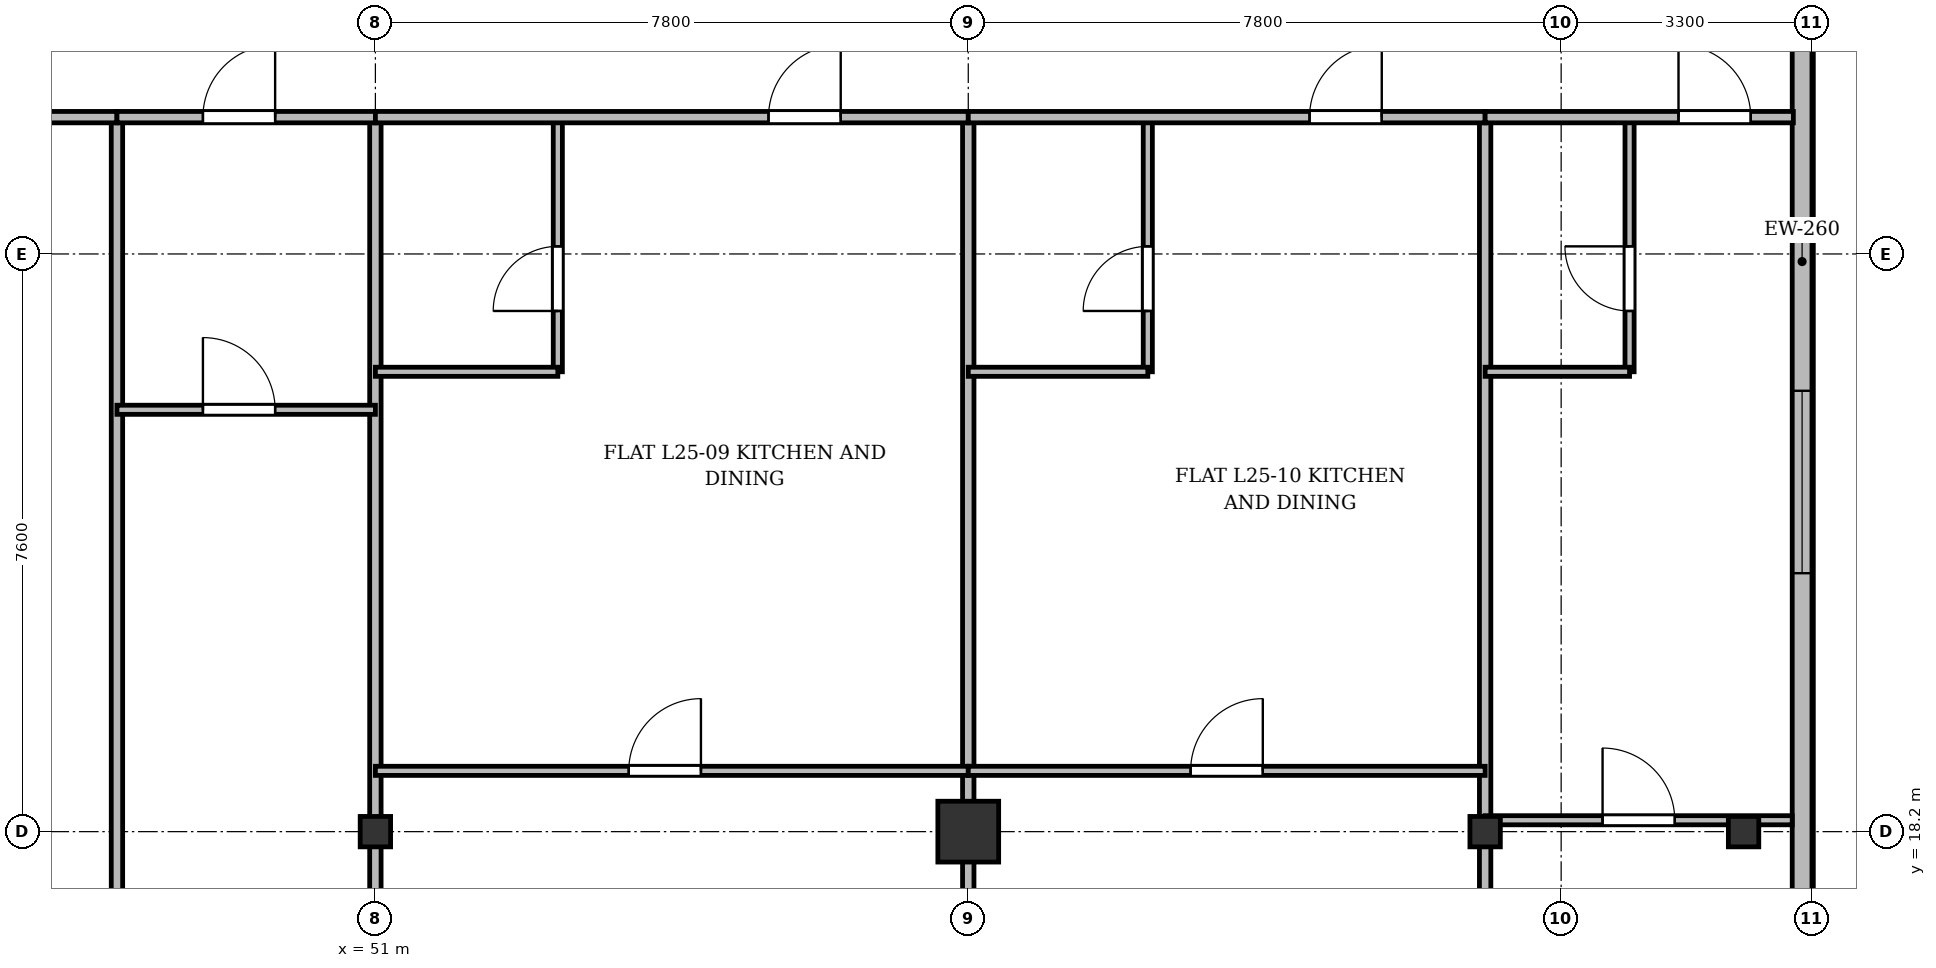
"""IFC4 building model, lengths in metres.
Left out: names, types, materials, properties, quantities, classifications, styles, units other than length and angle.
Written with IfcOpenShell. Run it as: python <this file> out.ifc"""

import sys

from ifc_helpers import new_model, si_unit, direction, frame, frame_2d, origin, origin_2d, place, context, subcontext, project, spatial, rectangle, i_section, extrude, source, transform, mapped, element, fill, save


model = new_model("IFC4")
c1 = context("Model", 3, precision=1e-05, world=origin(), true_north=direction((0.0, 1.0)))
c2 = subcontext(c1, "Body", "Model", "MODEL_VIEW")
j1 = project(units=[si_unit("LENGTHUNIT", "METRE"), si_unit("PLANEANGLEUNIT", "RADIAN")], contexts=[c1])
p1 = place(None, origin())
s1 = spatial("IfcSite", under=j1, at=p1, CompositionType="ELEMENT")
p2 = place(p1, origin())
s2 = spatial("IfcBuilding", under=s1, at=p2, CompositionType="ELEMENT")
p3 = place(p2, frame((0.0, 0.0, 99.7)))
s3 = spatial("IfcBuildingStorey", under=s2, at=p3, CompositionType="ELEMENT", Elevation=99.7)
m1 = source(origin(), c2, "Body", "SweptSolid", [
    extrude(i_section(OverallWidth=0.4, OverallDepth=0.4, WebThickness=0.022, FlangeThickness=0.035, at=origin_2d()), origin(), (0.0, 0.0, 1.0), 3.6),
])
p4 = place(p3, frame((51.0, 18.2, 0.0), z_axis=(0.0, 0.0, 1.0), x_axis=(1.0, 0.0, 0.0)))
e1 = element("IfcColumn", 1, at=p4, inside=s3, PredefinedType="COLUMN", context=c2, shape_type="MappedRepresentation", body=[
    mapped(m1, transform((0.0, 0.0, 0.0), x_axis=(1.0, 0.0, 0.0), y_axis=(0.0, 1.0, 0.0), z_axis=(0.0, 0.0, 1.0), scale=1.0)),
])
m2 = source(origin(), c2, "Body", "SweptSolid", [
    extrude(rectangle(XDim=0.8, YDim=0.8, at=origin_2d()), origin(), (0.0, 0.0, 1.0), 3.6),
])
p5 = place(p3, frame((58.8, 18.2, 0.0), z_axis=(0.0, 0.0, 1.0), x_axis=(1.0, 0.0, 0.0)))
e2 = element("IfcColumn", 2, at=p5, inside=s3, PredefinedType="COLUMN", context=c2, shape_type="MappedRepresentation", body=[
    mapped(m2, transform((0.0, 0.0, 0.0), x_axis=(1.0, 0.0, 0.0), y_axis=(0.0, 1.0, 0.0), z_axis=(0.0, 0.0, 1.0), scale=1.0)),
])
for number, where, z_axis, x_axis in (
    (3, (65.6, 18.2, 0.0), (0.0, 0.0, 1.0), (1.0, 0.0, 0.0)),
    (4, (69.0, 18.2, 0.0), (0.0, 0.0, 1.0), (1.0, 0.0, 0.0)),
):
    element("IfcColumn", number, at=place(p3, frame(where, z_axis=z_axis, x_axis=x_axis)), inside=s3, PredefinedType="COLUMN", context=c2, shape_type="MappedRepresentation", body=[
        mapped(m1, transform((0.0, 0.0, 0.0), x_axis=(1.0, 0.0, 0.0), y_axis=(0.0, 1.0, 0.0), z_axis=(0.0, 0.0, 1.0), scale=1.0)),
    ])
p6 = place(p3, frame((69.77, 45.5, 0.0), z_axis=(0.0, 0.0, 1.0), x_axis=(0.0, -1.0, 0.0)))
e5 = element("IfcWall", 5, at=p6, inside=s3, PredefinedType="SOLIDWALL", context=c2, shape_type="SweptSolid", body=[
    extrude(rectangle(XDim=39.6, YDim=0.26, at=frame_2d((19.8, 0.0))), origin(), (0.0, 0.0, 1.0), 3.34),
])
p7 = place(p6, frame((36.95, 0.0, 0.92)))
e6 = element("IfcOpeningElement", 6, at=p7, cuts=e5, PredefinedType="OPENING", context=c2, shape_type="SweptSolid", body=[
    extrude(rectangle(XDim=1.2, YDim=1.65, at=frame_2d((0.6, 0.825))), frame((0.0, 0.14, 0.0), z_axis=(0.0, -1.0, 0.0), x_axis=(1.0, 0.0, 0.0)), (0.0, 0.0, 1.0), 0.28),
])
p8 = place(p6, frame((32.9, 0.0, 0.92)))
e7 = element("IfcOpeningElement", 7, at=p8, cuts=e5, PredefinedType="OPENING", context=c2, shape_type="SweptSolid", body=[
    extrude(rectangle(XDim=2.4, YDim=2.1, at=frame_2d((1.2, 1.05))), frame((0.0, 0.14, 0.0), z_axis=(0.0, -1.0, 0.0), x_axis=(1.0, 0.0, 0.0)), (0.0, 0.0, 1.0), 0.28),
])
p9 = place(p6, frame((28.7, 0.0, 0.92)))
e8 = element("IfcOpeningElement", 8, at=p9, cuts=e5, PredefinedType="OPENING", context=c2, shape_type="SweptSolid", body=[
    extrude(rectangle(XDim=2.4, YDim=2.1, at=frame_2d((1.2, 1.05))), frame((0.0, 0.14, 0.0), z_axis=(0.0, -1.0, 0.0), x_axis=(1.0, 0.0, 0.0)), (0.0, 0.0, 1.0), 0.28),
])
p10 = place(p6, frame((21.5, 0.0, 0.92)))
e9 = element("IfcOpeningElement", 9, at=p10, cuts=e5, PredefinedType="OPENING", context=c2, shape_type="SweptSolid", body=[
    extrude(rectangle(XDim=2.4, YDim=2.1, at=frame_2d((1.2, 1.05))), frame((0.0, 0.14, 0.0), z_axis=(0.0, -1.0, 0.0), x_axis=(1.0, 0.0, 0.0)), (0.0, 0.0, 1.0), 0.28),
])
p11 = place(p6, frame((7.5, 0.0, 0.92)))
e10 = element("IfcOpeningElement", 10, at=p11, cuts=e5, PredefinedType="OPENING", context=c2, shape_type="SweptSolid", body=[
    extrude(rectangle(XDim=2.4, YDim=2.1, at=frame_2d((1.2, 1.05))), frame((0.0, 0.14, 0.0), z_axis=(0.0, -1.0, 0.0), x_axis=(1.0, 0.0, 0.0)), (0.0, 0.0, 1.0), 0.28),
])
p12 = place(p6, frame((4.5, 0.0, 0.92)))
e11 = element("IfcOpeningElement", 11, at=p12, cuts=e5, PredefinedType="OPENING", context=c2, shape_type="SweptSolid", body=[
    extrude(rectangle(XDim=1.2, YDim=1.65, at=frame_2d((0.6, 0.825))), frame((0.0, 0.14, 0.0), z_axis=(0.0, -1.0, 0.0), x_axis=(1.0, 0.0, 0.0)), (0.0, 0.0, 1.0), 0.28),
])
p13 = place(p6, frame((1.15, 0.0, 0.92)))
e12 = element("IfcOpeningElement", 12, at=p13, cuts=e5, PredefinedType="OPENING", context=c2, shape_type="SweptSolid", body=[
    extrude(rectangle(XDim=1.2, YDim=1.65, at=frame_2d((0.6, 0.825))), frame((0.0, 0.14, 0.0), z_axis=(0.0, -1.0, 0.0), x_axis=(1.0, 0.0, 0.0)), (0.0, 0.0, 1.0), 0.28),
])
p14 = place(p3, frame((47.6, 3.145, 0.0), z_axis=(0.0, 0.0, 1.0), x_axis=(0.0, 1.0, 0.0)))
e13 = element("IfcWall", 13, at=p14, inside=s3, PredefinedType="PARTITIONING", context=c2, shape_type="SweptSolid", body=[
    extrude(rectangle(XDim=24.455, YDim=0.15, at=frame_2d((12.228, 0.0))), origin(), (0.0, 0.0, 1.0), 2.752),
])
for number, where, z_axis, x_axis in (
    (14, (51.0, 3.145, 0.0), (0.0, 0.0, 1.0), (0.0, 1.0, 0.0)),
    (15, (58.8, 3.145, 0.0), (0.0, 0.0, 1.0), (0.0, 1.0, 0.0)),
    (16, (65.6, 3.145, 0.0), (0.0, 0.0, 1.0), (0.0, 1.0, 0.0)),
):
    element("IfcWall", number, at=place(p3, frame(where, z_axis=z_axis, x_axis=x_axis)), inside=s3, PredefinedType="PARTITIONING", context=c2, shape_type="SweptSolid", body=[
        extrude(rectangle(XDim=24.455, YDim=0.15, at=frame_2d((12.228, 0.0))), origin(), (0.0, 0.0, 1.0), 2.84),
    ])
p15 = place(p3, frame((43.8, 27.6, 0.0), z_axis=(0.0, 0.0, 1.0), x_axis=(1.0, 0.0, 0.0)))
e17 = element("IfcWall", 17, at=p15, inside=s3, PredefinedType="PARTITIONING", context=c2, shape_type="SweptSolid", body=[
    extrude(rectangle(XDim=3.8, YDim=0.15, at=frame_2d((1.9, 0.0))), origin(), (0.0, 0.0, 1.0), 2.84),
])
p16 = place(p15, frame((1.33, 0.0, 0.0)))
e18 = element("IfcOpeningElement", 18, at=p16, cuts=e17, PredefinedType="OPENING", context=c2, shape_type="SweptSolid", body=[
    extrude(rectangle(XDim=0.95, YDim=2.15, at=frame_2d((0.475, 1.075))), frame((0.0, 0.085, 0.0), z_axis=(0.0, -1.0, 0.0), x_axis=(1.0, 0.0, 0.0)), (0.0, 0.0, 1.0), 0.17),
])
p17 = place(p3, frame((47.6, 27.6, 0.0), z_axis=(0.0, 0.0, 1.0), x_axis=(1.0, 0.0, 0.0)))
e19 = element("IfcWall", 19, at=p17, inside=s3, PredefinedType="PARTITIONING", context=c2, shape_type="SweptSolid", body=[
    extrude(rectangle(XDim=3.4, YDim=0.15, at=frame_2d((1.7, 0.0))), origin(), (0.0, 0.0, 1.0), 2.84),
])
p18 = place(p17, frame((1.131, 0.0, 0.0)))
e20 = element("IfcOpeningElement", 20, at=p18, cuts=e19, PredefinedType="OPENING", context=c2, shape_type="SweptSolid", body=[
    extrude(rectangle(XDim=0.95, YDim=2.15, at=frame_2d((0.475, 1.075))), frame((0.0, 0.085, 0.0), z_axis=(0.0, -1.0, 0.0), x_axis=(1.0, 0.0, 0.0)), (0.0, 0.0, 1.0), 0.17),
])
p19 = place(p3, frame((47.6, 23.75, 0.0), z_axis=(0.0, 0.0, 1.0), x_axis=(1.0, 0.0, 0.0)))
e21 = element("IfcWall", 21, at=p19, inside=s3, PredefinedType="PARTITIONING", context=c2, shape_type="SweptSolid", body=[
    extrude(rectangle(XDim=3.4, YDim=0.12, at=frame_2d((1.7, 0.0))), origin(), (0.0, 0.0, 1.0), 2.84),
])
p20 = place(p19, frame((1.131, 0.0, 0.0)))
e22 = element("IfcOpeningElement", 22, at=p20, cuts=e21, PredefinedType="OPENING", context=c2, shape_type="SweptSolid", body=[
    extrude(rectangle(XDim=0.95, YDim=2.15, at=frame_2d((0.475, 1.075))), frame((0.0, 0.07, 0.0), z_axis=(0.0, -1.0, 0.0), x_axis=(1.0, 0.0, 0.0)), (0.0, 0.0, 1.0), 0.14),
])
p21 = place(p3, frame((51.0, 19.0, 0.0), z_axis=(0.0, 0.0, 1.0), x_axis=(1.0, 0.0, 0.0)))
e23 = element("IfcWall", 23, at=p21, inside=s3, PredefinedType="PARTITIONING", context=c2, shape_type="SweptSolid", body=[
    extrude(rectangle(XDim=7.8, YDim=0.12, at=frame_2d((3.9, 0.0))), origin(), (0.0, 0.0, 1.0), 2.84),
])
p22 = place(p21, frame((3.333, 0.0, 0.0)))
e24 = element("IfcOpeningElement", 24, at=p22, cuts=e23, PredefinedType="OPENING", context=c2, shape_type="SweptSolid", body=[
    extrude(rectangle(XDim=0.95, YDim=2.15, at=frame_2d((0.475, 1.075))), frame((0.0, 0.07, 0.0), z_axis=(0.0, -1.0, 0.0), x_axis=(1.0, 0.0, 0.0)), (0.0, 0.0, 1.0), 0.14),
])
p23 = place(p3, frame((53.4, 24.25, 0.0), z_axis=(0.0, 0.0, 1.0), x_axis=(0.0, 1.0, 0.0)))
e25 = element("IfcWall", 25, at=p23, inside=s3, PredefinedType="PARTITIONING", context=c2, shape_type="SweptSolid", body=[
    extrude(rectangle(XDim=3.35, YDim=0.12, at=frame_2d((1.675, 0.0))), origin(), (0.0, 0.0, 1.0), 2.99),
])
p24 = place(p23, frame((0.8, 0.0, 0.0)))
e26 = element("IfcOpeningElement", 26, at=p24, cuts=e25, PredefinedType="OPENING", context=c2, shape_type="SweptSolid", body=[
    extrude(rectangle(XDim=0.85, YDim=2.1, at=frame_2d((0.425, 1.05))), frame((0.0, 0.07, 0.0), z_axis=(0.0, -1.0, 0.0), x_axis=(1.0, 0.0, 0.0)), (0.0, 0.0, 1.0), 0.14),
])
p25 = place(p3, frame((51.0, 24.25, 0.0), z_axis=(0.0, 0.0, 1.0), x_axis=(1.0, 0.0, 0.0)))
e27 = element("IfcWall", 27, at=p25, inside=s3, PredefinedType="PARTITIONING", context=c2, shape_type="SweptSolid", body=[
    extrude(rectangle(XDim=2.4, YDim=0.12, at=frame_2d((1.2, 0.0))), origin(), (0.0, 0.0, 1.0), 2.84),
])
p26 = place(p3, frame((51.0, 27.6, 0.0), z_axis=(0.0, 0.0, 1.0), x_axis=(1.0, 0.0, 0.0)))
e28 = element("IfcWall", 28, at=p26, inside=s3, PredefinedType="PARTITIONING", context=c2, shape_type="SweptSolid", body=[
    extrude(rectangle(XDim=7.8, YDim=0.15, at=frame_2d((3.9, 0.0))), origin(), (0.0, 0.0, 1.0), 2.84),
])
p27 = place(p26, frame((5.172, 0.0, 0.0)))
e29 = element("IfcOpeningElement", 29, at=p27, cuts=e28, PredefinedType="OPENING", context=c2, shape_type="SweptSolid", body=[
    extrude(rectangle(XDim=0.95, YDim=2.15, at=frame_2d((0.475, 1.075))), frame((0.0, 0.085, 0.0), z_axis=(0.0, -1.0, 0.0), x_axis=(1.0, 0.0, 0.0)), (0.0, 0.0, 1.0), 0.17),
])
p28 = place(p3, frame((58.8, 19.0, 0.0), z_axis=(0.0, 0.0, 1.0), x_axis=(1.0, 0.0, 0.0)))
e30 = element("IfcWall", 30, at=p28, inside=s3, PredefinedType="PARTITIONING", context=c2, shape_type="SweptSolid", body=[
    extrude(rectangle(XDim=6.8, YDim=0.12, at=frame_2d((3.4, 0.0))), origin(), (0.0, 0.0, 1.0), 2.84),
])
p29 = place(p28, frame((2.925, 0.0, 0.0)))
e31 = element("IfcOpeningElement", 31, at=p29, cuts=e30, PredefinedType="OPENING", context=c2, shape_type="SweptSolid", body=[
    extrude(rectangle(XDim=0.95, YDim=2.15, at=frame_2d((0.475, 1.075))), frame((0.0, 0.07, 0.0), z_axis=(0.0, -1.0, 0.0), x_axis=(1.0, 0.0, 0.0)), (0.0, 0.0, 1.0), 0.14),
])
p30 = place(p3, frame((61.162, 24.25, 0.0), z_axis=(0.0, 0.0, 1.0), x_axis=(0.0, 1.0, 0.0)))
e32 = element("IfcWall", 32, at=p30, inside=s3, PredefinedType="PARTITIONING", context=c2, shape_type="SweptSolid", body=[
    extrude(rectangle(XDim=3.35, YDim=0.12, at=frame_2d((1.675, 0.0))), origin(), (0.0, 0.0, 1.0), 2.99),
])
p31 = place(p30, frame((0.8, 0.0, 0.0)))
e33 = element("IfcOpeningElement", 33, at=p31, cuts=e32, PredefinedType="OPENING", context=c2, shape_type="SweptSolid", body=[
    extrude(rectangle(XDim=0.85, YDim=2.1, at=frame_2d((0.425, 1.05))), frame((0.0, 0.07, 0.0), z_axis=(0.0, -1.0, 0.0), x_axis=(1.0, 0.0, 0.0)), (0.0, 0.0, 1.0), 0.14),
])
p32 = place(p3, frame((58.8, 24.25, 0.0), z_axis=(0.0, 0.0, 1.0), x_axis=(1.0, 0.0, 0.0)))
e34 = element("IfcWall", 34, at=p32, inside=s3, PredefinedType="PARTITIONING", context=c2, shape_type="SweptSolid", body=[
    extrude(rectangle(XDim=2.362, YDim=0.12, at=frame_2d((1.181, 0.0))), origin(), (0.0, 0.0, 1.0), 2.84),
])
p33 = place(p3, frame((58.8, 27.6, 0.0), z_axis=(0.0, 0.0, 1.0), x_axis=(1.0, 0.0, 0.0)))
e35 = element("IfcWall", 35, at=p33, inside=s3, PredefinedType="PARTITIONING", context=c2, shape_type="SweptSolid", body=[
    extrude(rectangle(XDim=6.8, YDim=0.15, at=frame_2d((3.4, 0.0))), origin(), (0.0, 0.0, 1.0), 2.84),
])
p34 = place(p33, frame((4.49, 0.0, 0.0)))
e36 = element("IfcOpeningElement", 36, at=p34, cuts=e35, PredefinedType="OPENING", context=c2, shape_type="SweptSolid", body=[
    extrude(rectangle(XDim=0.95, YDim=2.15, at=frame_2d((0.475, 1.075))), frame((0.0, 0.085, 0.0), z_axis=(0.0, -1.0, 0.0), x_axis=(1.0, 0.0, 0.0)), (0.0, 0.0, 1.0), 0.17),
])
p35 = place(p3, frame((65.6, 18.35, 0.0), z_axis=(0.0, 0.0, 1.0), x_axis=(1.0, 0.0, 0.0)))
e37 = element("IfcWall", 37, at=p35, inside=s3, PredefinedType="PARTITIONING", context=c2, shape_type="SweptSolid", body=[
    extrude(rectangle(XDim=4.04, YDim=0.12, at=frame_2d((2.02, 0.0))), origin(), (0.0, 0.0, 1.0), 2.752),
])
p36 = place(p35, frame((1.545, 0.0, 0.0)))
e38 = element("IfcOpeningElement", 38, at=p36, cuts=e37, PredefinedType="OPENING", context=c2, shape_type="SweptSolid", body=[
    extrude(rectangle(XDim=0.95, YDim=2.15, at=frame_2d((0.475, 1.075))), frame((0.0, 0.07, 0.0), z_axis=(0.0, -1.0, 0.0), x_axis=(1.0, 0.0, 0.0)), (0.0, 0.0, 1.0), 0.14),
])
p37 = place(p3, frame((67.5, 24.25, 0.0), z_axis=(0.0, 0.0, 1.0), x_axis=(0.0, 1.0, 0.0)))
e39 = element("IfcWall", 39, at=p37, inside=s3, PredefinedType="PARTITIONING", context=c2, shape_type="SweptSolid", body=[
    extrude(rectangle(XDim=3.35, YDim=0.12, at=frame_2d((1.675, 0.0))), origin(), (0.0, 0.0, 1.0), 2.99),
])
p38 = place(p37, frame((0.8, 0.0, 0.0)))
e40 = element("IfcOpeningElement", 40, at=p38, cuts=e39, PredefinedType="OPENING", context=c2, shape_type="SweptSolid", body=[
    extrude(rectangle(XDim=0.85, YDim=2.1, at=frame_2d((0.425, 1.05))), frame((0.0, 0.07, 0.0), z_axis=(0.0, -1.0, 0.0), x_axis=(1.0, 0.0, 0.0)), (0.0, 0.0, 1.0), 0.14),
])
p39 = place(p3, frame((65.6, 24.25, 0.0), z_axis=(0.0, 0.0, 1.0), x_axis=(1.0, 0.0, 0.0)))
e41 = element("IfcWall", 41, at=p39, inside=s3, PredefinedType="PARTITIONING", context=c2, shape_type="SweptSolid", body=[
    extrude(rectangle(XDim=1.9, YDim=0.12, at=frame_2d((0.95, 0.0))), origin(), (0.0, 0.0, 1.0), 2.84),
])
p40 = place(p3, frame((65.6, 27.6, 0.0), z_axis=(0.0, 0.0, 1.0), x_axis=(1.0, 0.0, 0.0)))
e42 = element("IfcWall", 42, at=p40, inside=s3, PredefinedType="PARTITIONING", context=c2, shape_type="SweptSolid", body=[
    extrude(rectangle(XDim=4.055, YDim=0.15, at=frame_2d((2.027, 0.0))), origin(), (0.0, 0.0, 1.0), 2.84),
])
p41 = place(p40, frame((2.544, 0.0, 0.0)))
e43 = element("IfcOpeningElement", 43, at=p41, cuts=e42, PredefinedType="OPENING", context=c2, shape_type="SweptSolid", body=[
    extrude(rectangle(XDim=0.95, YDim=2.15, at=frame_2d((0.475, 1.075))), frame((0.0, 0.085, 0.0), z_axis=(0.0, -1.0, 0.0), x_axis=(1.0, 0.0, 0.0)), (0.0, 0.0, 1.0), 0.17),
])
m3 = source(origin(), c2, "Body", "SweptSolid", [
    extrude(rectangle(XDim=2.4, YDim=2.1, at=frame_2d((1.2, 1.05))), frame((0.0, 0.03, 0.0), z_axis=(0.0, -1.0, 0.0), x_axis=(1.0, 0.0, 0.0)), (0.0, 0.0, 1.0), 0.06),
])
p42 = place(p10, origin())
e44 = element("IfcWindow", 44, at=p42, inside=s3, PartitioningType="SINGLE_PANEL", PredefinedType="WINDOW", context=c2, shape_type="MappedRepresentation", body=[
    mapped(m3, transform((0.0, 0.0, 0.0), x_axis=(1.0, 0.0, 0.0), y_axis=(0.0, 1.0, 0.0), z_axis=(0.0, 0.0, 1.0), scale=1.0)),
])
fill(e9, e44)
m4 = source(origin(), c2, "Body", "SweptSolid", [
    extrude(rectangle(XDim=0.95, YDim=2.15, at=frame_2d((0.475, 1.075))), frame((0.0, 0.025, 0.0), z_axis=(0.0, -1.0, 0.0), x_axis=(1.0, 0.0, 0.0)), (0.0, 0.0, 1.0), 0.05),
])
p43 = place(p18, origin())
e45 = element("IfcDoor", 45, at=p43, inside=s3, OperationType="SINGLE_SWING_RIGHT", PredefinedType="DOOR", context=c2, shape_type="MappedRepresentation", body=[
    mapped(m4, transform((0.0, 0.0, 0.0), x_axis=(1.0, 0.0, 0.0), y_axis=(0.0, 1.0, 0.0), z_axis=(0.0, 0.0, 1.0), scale=1.0)),
])
fill(e20, e45)
p44 = place(p20, origin())
e46 = element("IfcDoor", 46, at=p44, inside=s3, OperationType="SINGLE_SWING_LEFT", PredefinedType="DOOR", context=c2, shape_type="MappedRepresentation", body=[
    mapped(m4, transform((0.0, 0.0, 0.0), x_axis=(1.0, 0.0, 0.0), y_axis=(0.0, 1.0, 0.0), z_axis=(0.0, 0.0, 1.0), scale=1.0)),
])
fill(e22, e46)
p45 = place(p22, origin())
e47 = element("IfcDoor", 47, at=p45, inside=s3, OperationType="SINGLE_SWING_RIGHT", PredefinedType="DOOR", context=c2, shape_type="MappedRepresentation", body=[
    mapped(m4, transform((0.0, 0.0, 0.0), x_axis=(1.0, 0.0, 0.0), y_axis=(0.0, 1.0, 0.0), z_axis=(0.0, 0.0, 1.0), scale=1.0)),
])
fill(e24, e47)
m5 = source(origin(), c2, "Body", "SweptSolid", [
    extrude(rectangle(XDim=0.85, YDim=2.1, at=frame_2d((0.425, 1.05))), frame((0.0, 0.025, 0.0), z_axis=(0.0, -1.0, 0.0), x_axis=(1.0, 0.0, 0.0)), (0.0, 0.0, 1.0), 0.05),
])
p46 = place(p24, origin())
e48 = element("IfcDoor", 48, at=p46, inside=s3, OperationType="SINGLE_SWING_LEFT", PredefinedType="DOOR", context=c2, shape_type="MappedRepresentation", body=[
    mapped(m5, transform((0.0, 0.0, 0.0), x_axis=(1.0, 0.0, 0.0), y_axis=(0.0, 1.0, 0.0), z_axis=(0.0, 0.0, 1.0), scale=1.0)),
])
fill(e26, e48)
p47 = place(p27, origin())
e49 = element("IfcDoor", 49, at=p47, inside=s3, OperationType="SINGLE_SWING_RIGHT", PredefinedType="DOOR", context=c2, shape_type="MappedRepresentation", body=[
    mapped(m4, transform((0.0, 0.0, 0.0), x_axis=(1.0, 0.0, 0.0), y_axis=(0.0, 1.0, 0.0), z_axis=(0.0, 0.0, 1.0), scale=1.0)),
])
fill(e29, e49)
p48 = place(p29, origin())
e50 = element("IfcDoor", 50, at=p48, inside=s3, OperationType="SINGLE_SWING_RIGHT", PredefinedType="DOOR", context=c2, shape_type="MappedRepresentation", body=[
    mapped(m4, transform((0.0, 0.0, 0.0), x_axis=(1.0, 0.0, 0.0), y_axis=(0.0, 1.0, 0.0), z_axis=(0.0, 0.0, 1.0), scale=1.0)),
])
fill(e31, e50)
p49 = place(p31, origin())
e51 = element("IfcDoor", 51, at=p49, inside=s3, OperationType="SINGLE_SWING_LEFT", PredefinedType="DOOR", context=c2, shape_type="MappedRepresentation", body=[
    mapped(m5, transform((0.0, 0.0, 0.0), x_axis=(1.0, 0.0, 0.0), y_axis=(0.0, 1.0, 0.0), z_axis=(0.0, 0.0, 1.0), scale=1.0)),
])
fill(e33, e51)
p50 = place(p34, origin())
e52 = element("IfcDoor", 52, at=p50, inside=s3, OperationType="SINGLE_SWING_RIGHT", PredefinedType="DOOR", context=c2, shape_type="MappedRepresentation", body=[
    mapped(m4, transform((0.0, 0.0, 0.0), x_axis=(1.0, 0.0, 0.0), y_axis=(0.0, 1.0, 0.0), z_axis=(0.0, 0.0, 1.0), scale=1.0)),
])
fill(e36, e52)
p51 = place(p36, origin())
e53 = element("IfcDoor", 53, at=p51, inside=s3, OperationType="SINGLE_SWING_LEFT", PredefinedType="DOOR", context=c2, shape_type="MappedRepresentation", body=[
    mapped(m4, transform((0.0, 0.0, 0.0), x_axis=(1.0, 0.0, 0.0), y_axis=(0.0, 1.0, 0.0), z_axis=(0.0, 0.0, 1.0), scale=1.0)),
])
fill(e38, e53)
p52 = place(p38, origin())
e54 = element("IfcDoor", 54, at=p52, inside=s3, OperationType="SINGLE_SWING_RIGHT", PredefinedType="DOOR", context=c2, shape_type="MappedRepresentation", body=[
    mapped(m5, transform((0.0, 0.0, 0.0), x_axis=(1.0, 0.0, 0.0), y_axis=(0.0, 1.0, 0.0), z_axis=(0.0, 0.0, 1.0), scale=1.0)),
])
fill(e40, e54)
p53 = place(p41, origin())
e55 = element("IfcDoor", 55, at=p53, inside=s3, OperationType="SINGLE_SWING_LEFT", PredefinedType="DOOR", context=c2, shape_type="MappedRepresentation", body=[
    mapped(m4, transform((0.0, 0.0, 0.0), x_axis=(1.0, 0.0, 0.0), y_axis=(0.0, 1.0, 0.0), z_axis=(0.0, 0.0, 1.0), scale=1.0)),
])
fill(e43, e55)
save(model, sys.argv[1])
